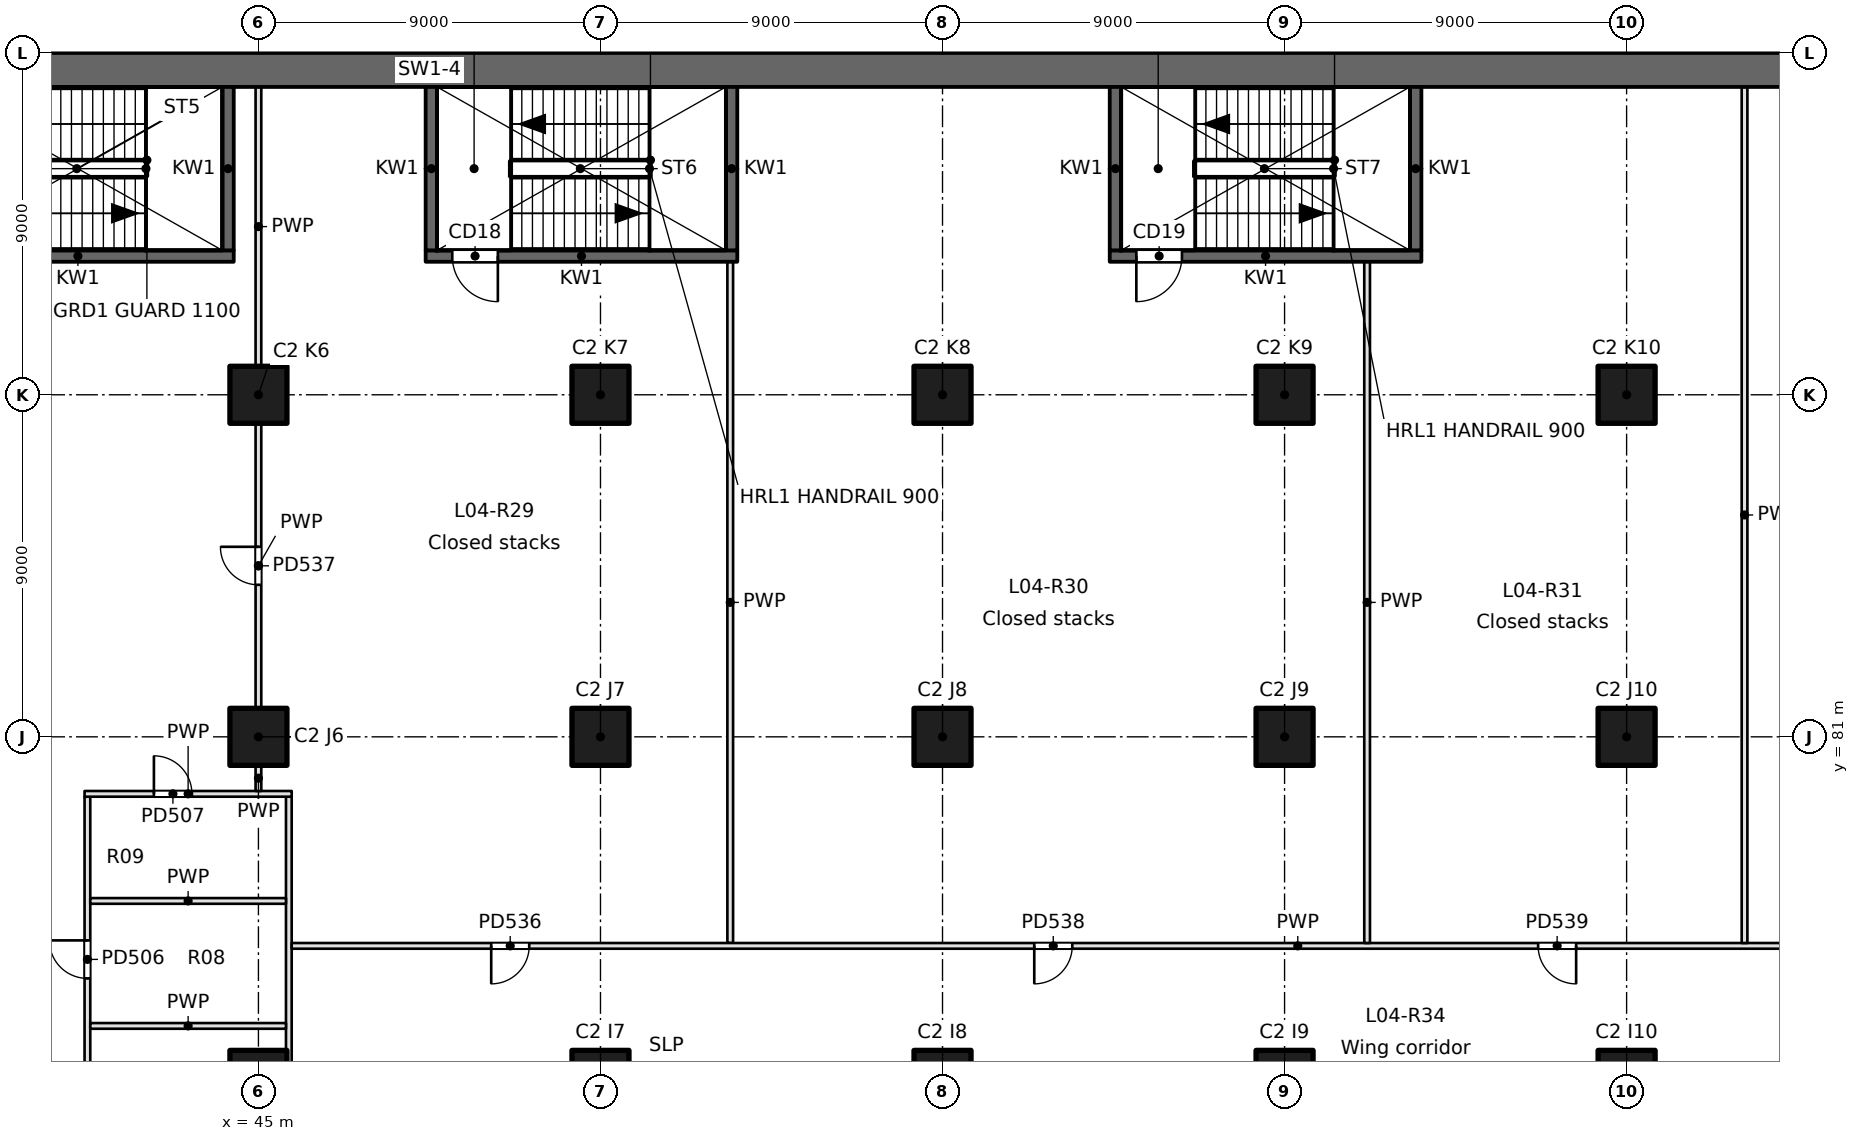
"""IFC4 building model, lengths in metres.
Left out: names, types, materials, properties, quantities, classifications, styles, units other than length and angle.
Written with IfcOpenShell. Run it as: python <this file> out.ifc"""

import sys

from ifc_helpers import new_model, si_unit, direction, frame, frame_2d, origin, origin_2d, place, context, subcontext, project, spatial, rectangle, extrude, element, fill, save


model = new_model("IFC4")
c1 = context("Model", 3, precision=1e-05, world=origin(), true_north=direction((0.0, 1.0)))
c2 = subcontext(c1, "Body", "Model", "MODEL_VIEW")
j1 = project(units=[si_unit("LENGTHUNIT", "METRE"), si_unit("PLANEANGLEUNIT", "RADIAN")], contexts=[c1])
p1 = place(None, origin())
s1 = spatial("IfcSite", under=j1, at=p1, CompositionType="ELEMENT")
p2 = place(p1, origin())
s2 = spatial("IfcBuilding", under=s1, at=p2, CompositionType="ELEMENT")
p3 = place(p2, frame((0.0, 0.0, 21.6)))
s3 = spatial("IfcBuildingStorey", under=s2, at=p3, CompositionType="ELEMENT", Elevation=21.6)
for number, where, z_axis, x_axis in (
    (1, (45.0, 72.0, 0.0), (0.0, 0.0, 1.0), (1.0, 0.0, 0.0)),
    (2, (45.0, 81.0, 0.0), (0.0, 0.0, 1.0), (1.0, 0.0, 0.0)),
    (3, (45.0, 90.0, 0.0), (0.0, 0.0, 1.0), (1.0, 0.0, 0.0)),
    (4, (54.0, 72.0, 0.0), (0.0, 0.0, 1.0), (1.0, 0.0, 0.0)),
    (5, (54.0, 81.0, 0.0), (0.0, 0.0, 1.0), (1.0, 0.0, 0.0)),
    (6, (54.0, 90.0, 0.0), (0.0, 0.0, 1.0), (1.0, 0.0, 0.0)),
    (7, (63.0, 72.0, 0.0), (0.0, 0.0, 1.0), (1.0, 0.0, 0.0)),
    (8, (63.0, 81.0, 0.0), (0.0, 0.0, 1.0), (1.0, 0.0, 0.0)),
    (9, (63.0, 90.0, 0.0), (0.0, 0.0, 1.0), (1.0, 0.0, 0.0)),
    (10, (72.0, 72.0, 0.0), (0.0, 0.0, 1.0), (1.0, 0.0, 0.0)),
    (11, (72.0, 81.0, 0.0), (0.0, 0.0, 1.0), (1.0, 0.0, 0.0)),
    (12, (72.0, 90.0, 0.0), (0.0, 0.0, 1.0), (1.0, 0.0, 0.0)),
    (13, (81.0, 72.0, 0.0), (0.0, 0.0, 1.0), (1.0, 0.0, 0.0)),
    (14, (81.0, 81.0, 0.0), (0.0, 0.0, 1.0), (1.0, 0.0, 0.0)),
    (15, (81.0, 90.0, 0.0), (0.0, 0.0, 1.0), (1.0, 0.0, 0.0)),
):
    element("IfcColumn", number, at=place(p3, frame(where, z_axis=z_axis, x_axis=x_axis)), inside=s3, PredefinedType="COLUMN", context=c2, shape_type="SweptSolid", body=[
        extrude(rectangle(XDim=1.5, YDim=1.5, at=origin_2d()), origin(), (0.0, 0.0, 1.0), 4.8),
    ])
p4 = place(p3, frame((94.5, 98.55, 0.0), z_axis=(0.0, 0.0, 1.0), x_axis=(-1.0, 0.0, 0.0)))
e16 = element("IfcWall", 16, at=p4, inside=s3, PredefinedType="SHEAR", context=c2, shape_type="SweptSolid", body=[
    extrude(rectangle(XDim=90.0, YDim=0.9, at=frame_2d((45.0, 0.0))), origin(), (0.0, 0.0, 1.0), 4.8),
])
p5 = place(p3, frame((36.15, 93.65, -0.35), z_axis=(0.0, 0.0, 1.0), x_axis=(1.0, 0.0, 0.0)))
e17 = element("IfcWall", 17, at=p5, inside=s3, PredefinedType="SOLIDWALL", context=c2, shape_type="SweptSolid", body=[
    extrude(rectangle(XDim=8.2, YDim=0.3, at=frame_2d((4.1, 0.0))), origin(), (0.0, 0.0, 1.0), 4.8),
])
p6 = place(p5, frame((0.7, 0.0, 0.35)))
e18 = element("IfcOpeningElement", 18, at=p6, cuts=e17, PredefinedType="OPENING", context=c2, shape_type="SweptSolid", body=[
    extrude(rectangle(XDim=1.2, YDim=2.1, at=frame_2d((0.6, 1.05))), frame((0.0, 0.15, 0.0), z_axis=(0.0, -1.0, 0.0), x_axis=(1.0, 0.0, 0.0)), (0.0, 0.0, 1.0), 0.3),
])
p7 = place(p3, frame((49.4, 93.65, -0.35), z_axis=(0.0, 0.0, 1.0), x_axis=(1.0, 0.0, 0.0)))
e19 = element("IfcWall", 19, at=p7, inside=s3, PredefinedType="SOLIDWALL", context=c2, shape_type="SweptSolid", body=[
    extrude(rectangle(XDim=8.2, YDim=0.3, at=frame_2d((4.1, 0.0))), origin(), (0.0, 0.0, 1.0), 4.8),
])
p8 = place(p7, frame((0.7, 0.0, 0.35)))
e20 = element("IfcOpeningElement", 20, at=p8, cuts=e19, PredefinedType="OPENING", context=c2, shape_type="SweptSolid", body=[
    extrude(rectangle(XDim=1.2, YDim=2.1, at=frame_2d((0.6, 1.05))), frame((0.0, 0.15, 0.0), z_axis=(0.0, -1.0, 0.0), x_axis=(1.0, 0.0, 0.0)), (0.0, 0.0, 1.0), 0.3),
])
p9 = place(p3, frame((67.4, 93.65, -0.35), z_axis=(0.0, 0.0, 1.0), x_axis=(1.0, 0.0, 0.0)))
e21 = element("IfcWall", 21, at=p9, inside=s3, PredefinedType="SOLIDWALL", context=c2, shape_type="SweptSolid", body=[
    extrude(rectangle(XDim=8.2, YDim=0.3, at=frame_2d((4.1, 0.0))), origin(), (0.0, 0.0, 1.0), 4.8),
])
p10 = place(p9, frame((0.7, 0.0, 0.35)))
e22 = element("IfcOpeningElement", 22, at=p10, cuts=e21, PredefinedType="OPENING", context=c2, shape_type="SweptSolid", body=[
    extrude(rectangle(XDim=1.2, YDim=2.1, at=frame_2d((0.6, 1.05))), frame((0.0, 0.15, 0.0), z_axis=(0.0, -1.0, 0.0), x_axis=(1.0, 0.0, 0.0)), (0.0, 0.0, 1.0), 0.3),
])
for number, where, z_axis, x_axis in (
    (23, (44.2, 93.8, -0.35), (0.0, 0.0, 1.0), (0.0, 1.0, 0.0)),
    (24, (49.55, 93.8, -0.35), (0.0, 0.0, 1.0), (0.0, 1.0, 0.0)),
    (25, (57.45, 93.8, -0.35), (0.0, 0.0, 1.0), (0.0, 1.0, 0.0)),
    (26, (67.55, 93.8, -0.35), (0.0, 0.0, 1.0), (0.0, 1.0, 0.0)),
    (27, (75.45, 93.8, -0.35), (0.0, 0.0, 1.0), (0.0, 1.0, 0.0)),
):
    element("IfcWall", number, at=place(p3, frame(where, z_axis=z_axis, x_axis=x_axis)), inside=s3, PredefinedType="SOLIDWALL", context=c2, shape_type="SweptSolid", body=[
        extrude(rectangle(XDim=4.3, YDim=0.3, at=frame_2d((2.15, 0.0))), origin(), (0.0, 0.0, 1.0), 4.8),
    ])
p11 = place(p3, frame((45.8, 79.425, 0.0), z_axis=(0.0, 0.0, 1.0), x_axis=(0.0, -1.0, 0.0)))
e28 = element("IfcWall", 28, at=p11, inside=s3, PredefinedType="PARTITIONING", context=c2, shape_type="SweptSolid", body=[
    extrude(rectangle(XDim=15.35, YDim=0.15, at=frame_2d((7.675, 0.0))), origin(), (0.0, 0.0, 1.0), 4.45),
])
p12 = place(p3, frame((40.5, 64.075, 0.0), z_axis=(0.0, 0.0, 1.0), x_axis=(0.0, 1.0, 0.0)))
e29 = element("IfcWall", 29, at=p12, inside=s3, PredefinedType="PARTITIONING", context=c2, shape_type="SweptSolid", body=[
    extrude(rectangle(XDim=15.35, YDim=0.15, at=frame_2d((7.675, 0.0))), origin(), (0.0, 0.0, 1.0), 4.45),
])
p13 = place(p12, frame((1.75, 0.0, 0.0)))
e30 = element("IfcOpeningElement", 30, at=p13, cuts=e29, PredefinedType="OPENING", context=c2, shape_type="SweptSolid", body=[
    extrude(rectangle(XDim=1.0, YDim=2.1, at=frame_2d((0.5, 1.05))), frame((0.0, 0.075, 0.0), z_axis=(0.0, -1.0, 0.0), x_axis=(1.0, 0.0, 0.0)), (0.0, 0.0, 1.0), 0.15),
])
p14 = place(p12, frame((6.372, 0.0, 0.0)))
e31 = element("IfcOpeningElement", 31, at=p14, cuts=e29, PredefinedType="OPENING", context=c2, shape_type="SweptSolid", body=[
    extrude(rectangle(XDim=1.0, YDim=2.1, at=frame_2d((0.5, 1.05))), frame((0.0, 0.075, 0.0), z_axis=(0.0, -1.0, 0.0), x_axis=(1.0, 0.0, 0.0)), (0.0, 0.0, 1.0), 0.15),
])
p15 = place(p12, frame((10.569, 0.0, 0.0)))
e32 = element("IfcOpeningElement", 32, at=p15, cuts=e29, PredefinedType="OPENING", context=c2, shape_type="SweptSolid", body=[
    extrude(rectangle(XDim=1.0, YDim=2.1, at=frame_2d((0.5, 1.05))), frame((0.0, 0.075, 0.0), z_axis=(0.0, -1.0, 0.0), x_axis=(1.0, 0.0, 0.0)), (0.0, 0.0, 1.0), 0.15),
])
for number, where, z_axis, x_axis in (
    (33, (40.575, 73.394, 0.0), (0.0, 0.0, 1.0), (1.0, 0.0, 0.0)),
    (34, (40.575, 76.682, 0.0), (0.0, 0.0, 1.0), (1.0, 0.0, 0.0)),
):
    element("IfcWall", number, at=place(p3, frame(where, z_axis=z_axis, x_axis=x_axis)), inside=s3, PredefinedType="PARTITIONING", context=c2, shape_type="SweptSolid", body=[
        extrude(rectangle(XDim=5.15, YDim=0.15, at=frame_2d((2.575, 0.0))), origin(), (0.0, 0.0, 1.0), 4.45),
    ])
p16 = place(p3, frame((40.425, 79.5, 0.0), z_axis=(0.0, 0.0, 1.0), x_axis=(1.0, 0.0, 0.0)))
e35 = element("IfcWall", 35, at=p16, inside=s3, PredefinedType="PARTITIONING", context=c2, shape_type="SweptSolid", body=[
    extrude(rectangle(XDim=5.45, YDim=0.15, at=frame_2d((2.725, 0.0))), origin(), (0.0, 0.0, 1.0), 4.45),
])
p17 = place(p16, frame((1.825, 0.0, 0.0)))
e36 = element("IfcOpeningElement", 36, at=p17, cuts=e35, PredefinedType="OPENING", context=c2, shape_type="SweptSolid", body=[
    extrude(rectangle(XDim=1.0, YDim=2.1, at=frame_2d((0.5, 1.05))), frame((0.0, 0.075, 0.0), z_axis=(0.0, -1.0, 0.0), x_axis=(1.0, 0.0, 0.0)), (0.0, 0.0, 1.0), 0.15),
])
p18 = place(p3, frame((45.0, 79.575, 0.0), z_axis=(0.0, 0.0, 1.0), x_axis=(0.0, 1.0, 0.0)))
e37 = element("IfcWall", 37, at=p18, inside=s3, PredefinedType="PARTITIONING", context=c2, shape_type="SweptSolid", body=[
    extrude(rectangle(XDim=0.675, YDim=0.15, at=frame_2d((0.337, 0.0))), origin(), (0.0, 0.0, 1.0), 4.45),
])
p19 = place(p3, frame((45.0, 81.75, 0.0), z_axis=(0.0, 0.0, 1.0), x_axis=(0.0, 1.0, 0.0)))
e38 = element("IfcWall", 38, at=p19, inside=s3, PredefinedType="PARTITIONING", context=c2, shape_type="SweptSolid", body=[
    extrude(rectangle(XDim=7.5, YDim=0.15, at=frame_2d((3.75, 0.0))), origin(), (0.0, 0.0, 1.0), 4.45),
])
p20 = place(p19, frame((3.25, 0.0, 0.0)))
e39 = element("IfcOpeningElement", 39, at=p20, cuts=e38, PredefinedType="OPENING", context=c2, shape_type="SweptSolid", body=[
    extrude(rectangle(XDim=1.0, YDim=2.1, at=frame_2d((0.5, 1.05))), frame((0.0, 0.075, 0.0), z_axis=(0.0, -1.0, 0.0), x_axis=(1.0, 0.0, 0.0)), (0.0, 0.0, 1.0), 0.15),
])
p21 = place(p3, frame((45.0, 90.75, 0.0), z_axis=(0.0, 0.0, 1.0), x_axis=(0.0, 1.0, 0.0)))
e40 = element("IfcWall", 40, at=p21, inside=s3, PredefinedType="PARTITIONING", context=c2, shape_type="SweptSolid", body=[
    extrude(rectangle(XDim=7.35, YDim=0.15, at=frame_2d((3.675, 0.0))), origin(), (0.0, 0.0, 1.0), 4.45),
])
p22 = place(p3, frame((57.414, 75.575, 0.0), z_axis=(0.0, 0.0, 1.0), x_axis=(0.0, 1.0, 0.0)))
e41 = element("IfcWall", 41, at=p22, inside=s3, PredefinedType="PARTITIONING", context=c2, shape_type="SweptSolid", body=[
    extrude(rectangle(XDim=17.925, YDim=0.15, at=frame_2d((8.962, 0.0))), origin(), (0.0, 0.0, 1.0), 4.45),
])
p23 = place(p3, frame((98.82, 75.5, 0.0), z_axis=(0.0, 0.0, 1.0), x_axis=(-1.0, 0.0, 0.0)))
e42 = element("IfcWall", 42, at=p23, inside=s3, PredefinedType="PARTITIONING", context=c2, shape_type="SweptSolid", body=[
    extrude(rectangle(XDim=52.945, YDim=0.15, at=frame_2d((26.473, 0.0))), origin(), (0.0, 0.0, 1.0), 4.45),
])
p24 = place(p23, frame((46.695, 0.0, 0.0)))
e43 = element("IfcOpeningElement", 43, at=p24, cuts=e42, PredefinedType="OPENING", context=c2, shape_type="SweptSolid", body=[
    extrude(rectangle(XDim=1.0, YDim=2.1, at=frame_2d((0.5, 1.05))), frame((0.0, 0.075, 0.0), z_axis=(0.0, -1.0, 0.0), x_axis=(1.0, 0.0, 0.0)), (0.0, 0.0, 1.0), 0.15),
])
p25 = place(p23, frame((32.406, 0.0, 0.0)))
e44 = element("IfcOpeningElement", 44, at=p25, cuts=e42, PredefinedType="OPENING", context=c2, shape_type="SweptSolid", body=[
    extrude(rectangle(XDim=1.0, YDim=2.1, at=frame_2d((0.5, 1.05))), frame((0.0, 0.075, 0.0), z_axis=(0.0, -1.0, 0.0), x_axis=(1.0, 0.0, 0.0)), (0.0, 0.0, 1.0), 0.15),
])
p26 = place(p23, frame((19.148, 0.0, 0.0)))
e45 = element("IfcOpeningElement", 45, at=p26, cuts=e42, PredefinedType="OPENING", context=c2, shape_type="SweptSolid", body=[
    extrude(rectangle(XDim=1.0, YDim=2.1, at=frame_2d((0.5, 1.05))), frame((0.0, 0.075, 0.0), z_axis=(0.0, -1.0, 0.0), x_axis=(1.0, 0.0, 0.0)), (0.0, 0.0, 1.0), 0.15),
])
p27 = place(p23, frame((6.417, 0.0, 0.0)))
e46 = element("IfcOpeningElement", 46, at=p27, cuts=e42, PredefinedType="OPENING", context=c2, shape_type="SweptSolid", body=[
    extrude(rectangle(XDim=1.8, YDim=2.1, at=frame_2d((0.9, 1.05))), frame((0.0, 0.075, 0.0), z_axis=(0.0, -1.0, 0.0), x_axis=(1.0, 0.0, 0.0)), (0.0, 0.0, 1.0), 0.15),
])
p28 = place(p3, frame((74.172, 75.575, 0.0), z_axis=(0.0, 0.0, 1.0), x_axis=(0.0, 1.0, 0.0)))
e47 = element("IfcWall", 47, at=p28, inside=s3, PredefinedType="PARTITIONING", context=c2, shape_type="SweptSolid", body=[
    extrude(rectangle(XDim=17.925, YDim=0.15, at=frame_2d((8.962, 0.0))), origin(), (0.0, 0.0, 1.0), 4.45),
])
p29 = place(p3, frame((84.103, 75.575, 0.0), z_axis=(0.0, 0.0, 1.0), x_axis=(0.0, 1.0, 0.0)))
e48 = element("IfcWall", 48, at=p29, inside=s3, PredefinedType="PARTITIONING", context=c2, shape_type="SweptSolid", body=[
    extrude(rectangle(XDim=22.525, YDim=0.15, at=frame_2d((11.263, 0.0))), origin(), (0.0, 0.0, 1.0), 4.45),
])
p30 = place(p8, frame((1.2, 0.0, 0.0), z_axis=(0.0, 0.0, 1.0), x_axis=(-1.0, 0.0, 0.0)))
e49 = element("IfcDoor", 49, at=p30, inside=s3, OperationType="SINGLE_SWING_LEFT", PredefinedType="DOOR", context=c2, shape_type="SweptSolid", body=[
    extrude(rectangle(XDim=1.2, YDim=2.1, at=frame_2d((0.6, 1.05))), frame((0.0, 0.025, 0.0), z_axis=(0.0, -1.0, 0.0), x_axis=(1.0, 0.0, 0.0)), (0.0, 0.0, 1.0), 0.05),
])
fill(e20, e49)
p31 = place(p10, frame((1.2, 0.0, 0.0), z_axis=(0.0, 0.0, 1.0), x_axis=(-1.0, 0.0, 0.0)))
e50 = element("IfcDoor", 50, at=p31, inside=s3, OperationType="SINGLE_SWING_RIGHT", PredefinedType="DOOR", context=c2, shape_type="SweptSolid", body=[
    extrude(rectangle(XDim=1.2, YDim=2.1, at=frame_2d((0.6, 1.05))), frame((0.0, 0.025, 0.0), z_axis=(0.0, -1.0, 0.0), x_axis=(1.0, 0.0, 0.0)), (0.0, 0.0, 1.0), 0.05),
])
fill(e22, e50)
p32 = place(p15, origin())
e51 = element("IfcDoor", 51, at=p32, inside=s3, OperationType="SINGLE_SWING_RIGHT", PredefinedType="DOOR", context=c2, shape_type="SweptSolid", body=[
    extrude(rectangle(XDim=1.0, YDim=2.1, at=frame_2d((0.5, 1.05))), frame((0.0, 0.025, 0.0), z_axis=(0.0, -1.0, 0.0), x_axis=(1.0, 0.0, 0.0)), (0.0, 0.0, 1.0), 0.05),
])
fill(e32, e51)
p33 = place(p17, origin())
e52 = element("IfcDoor", 52, at=p33, inside=s3, OperationType="SINGLE_SWING_LEFT", PredefinedType="DOOR", context=c2, shape_type="SweptSolid", body=[
    extrude(rectangle(XDim=1.0, YDim=2.1, at=frame_2d((0.5, 1.05))), frame((0.0, 0.025, 0.0), z_axis=(0.0, -1.0, 0.0), x_axis=(1.0, 0.0, 0.0)), (0.0, 0.0, 1.0), 0.05),
])
fill(e36, e52)
p34 = place(p24, origin())
e53 = element("IfcDoor", 53, at=p34, inside=s3, OperationType="SINGLE_SWING_RIGHT", PredefinedType="DOOR", context=c2, shape_type="SweptSolid", body=[
    extrude(rectangle(XDim=1.0, YDim=2.1, at=frame_2d((0.5, 1.05))), frame((0.0, 0.025, 0.0), z_axis=(0.0, -1.0, 0.0), x_axis=(1.0, 0.0, 0.0)), (0.0, 0.0, 1.0), 0.05),
])
fill(e43, e53)
p35 = place(p20, origin())
e54 = element("IfcDoor", 54, at=p35, inside=s3, OperationType="SINGLE_SWING_RIGHT", PredefinedType="DOOR", context=c2, shape_type="SweptSolid", body=[
    extrude(rectangle(XDim=1.0, YDim=2.1, at=frame_2d((0.5, 1.05))), frame((0.0, 0.025, 0.0), z_axis=(0.0, -1.0, 0.0), x_axis=(1.0, 0.0, 0.0)), (0.0, 0.0, 1.0), 0.05),
])
fill(e39, e54)
p36 = place(p25, origin())
e55 = element("IfcDoor", 55, at=p36, inside=s3, OperationType="SINGLE_SWING_RIGHT", PredefinedType="DOOR", context=c2, shape_type="SweptSolid", body=[
    extrude(rectangle(XDim=1.0, YDim=2.1, at=frame_2d((0.5, 1.05))), frame((0.0, 0.025, 0.0), z_axis=(0.0, -1.0, 0.0), x_axis=(1.0, 0.0, 0.0)), (0.0, 0.0, 1.0), 0.05),
])
fill(e44, e55)
p37 = place(p26, origin())
e56 = element("IfcDoor", 56, at=p37, inside=s3, OperationType="SINGLE_SWING_LEFT", PredefinedType="DOOR", context=c2, shape_type="SweptSolid", body=[
    extrude(rectangle(XDim=1.0, YDim=2.1, at=frame_2d((0.5, 1.05))), frame((0.0, 0.025, 0.0), z_axis=(0.0, -1.0, 0.0), x_axis=(1.0, 0.0, 0.0)), (0.0, 0.0, 1.0), 0.05),
])
fill(e45, e56)
save(model, sys.argv[1])
